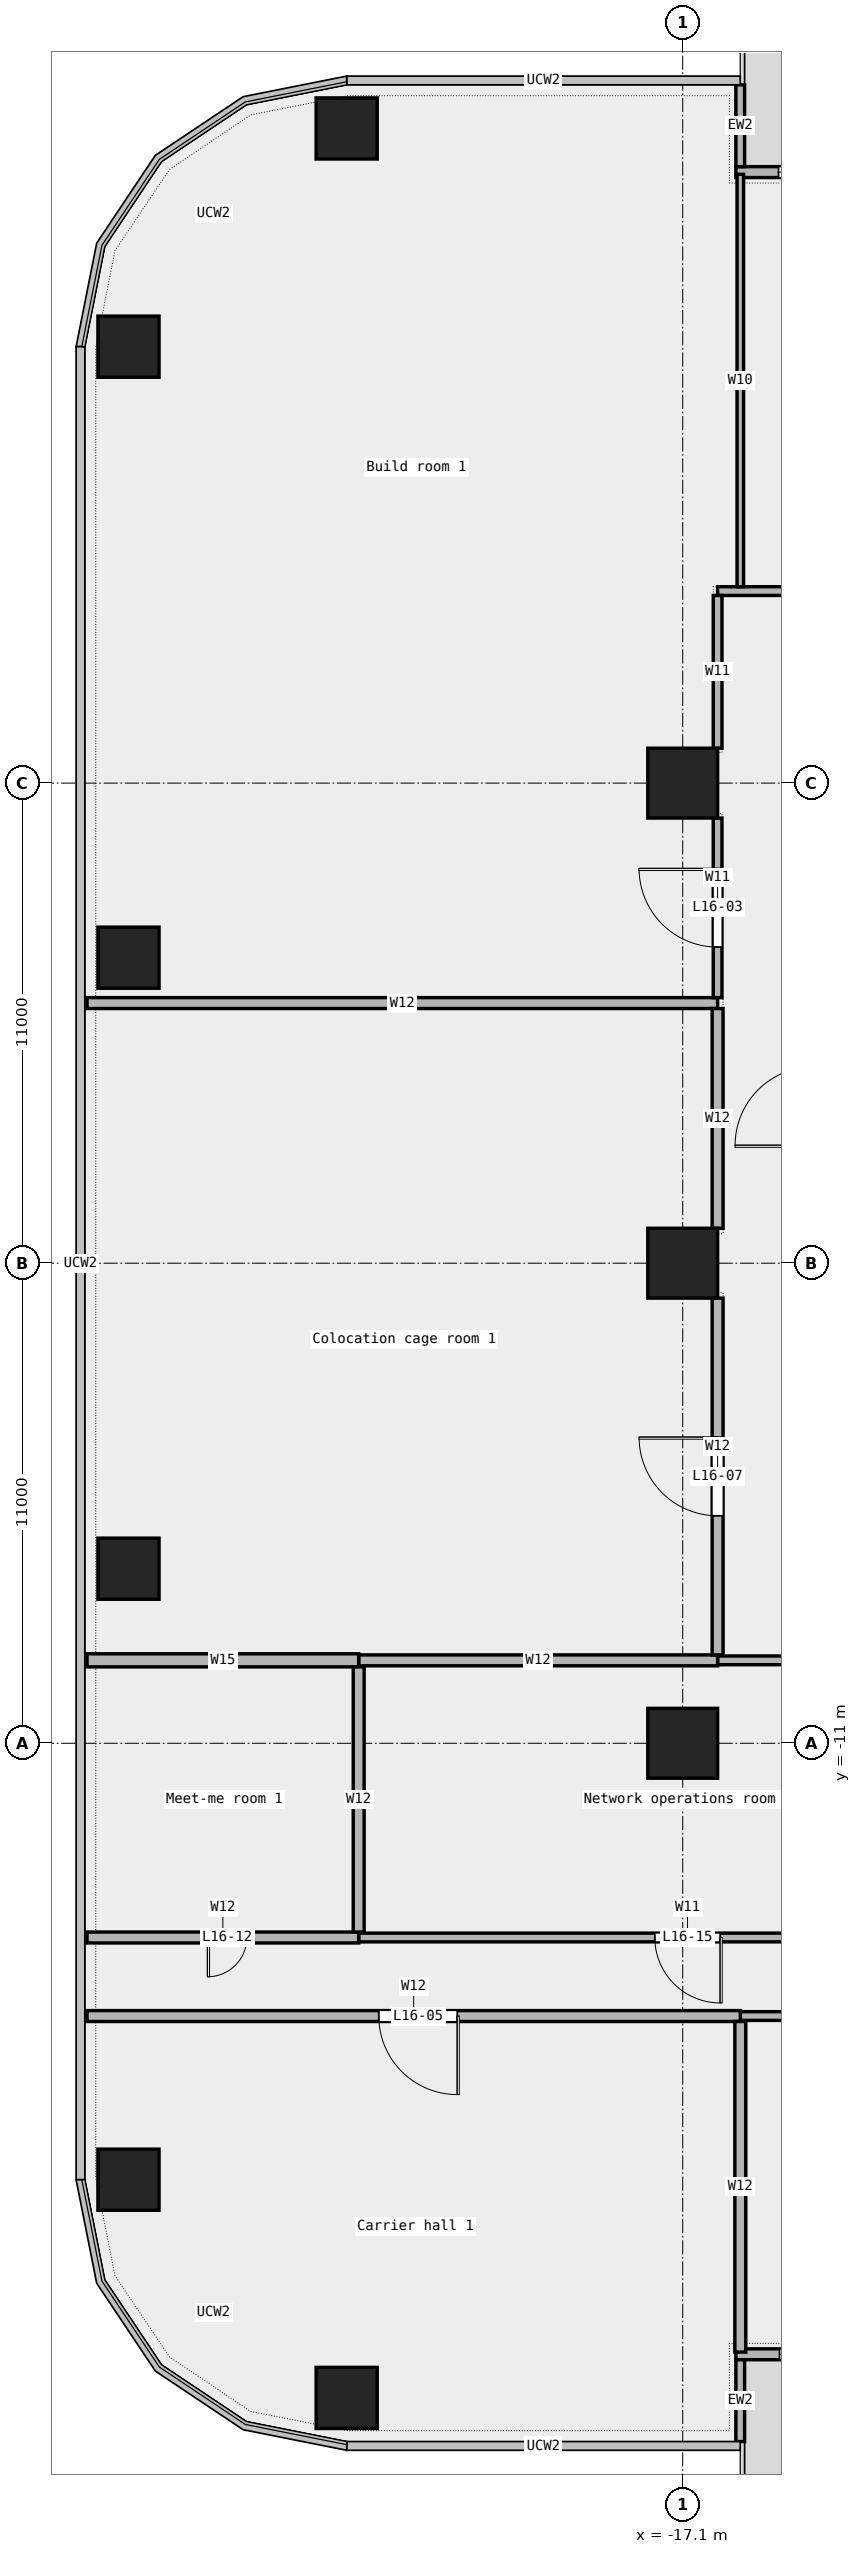
"""IFC4 building model, lengths in metres.
Left out: names, types, materials, properties, quantities, classifications, styles, units other than length and angle.
Written with IfcOpenShell. Run it as: python <this file> out.ifc"""

import sys

from ifc_helpers import new_model, si_unit, direction, frame, frame_2d, origin, origin_2d, place, context, subcontext, project, spatial, rectangle, extrude, element, fill, save


model = new_model("IFC4")
c1 = context("Model", 3, precision=1e-05, world=origin(), true_north=direction((0.0, 1.0)))
c2 = subcontext(c1, "Body", "Model", "MODEL_VIEW")
j1 = project(units=[si_unit("LENGTHUNIT", "METRE"), si_unit("PLANEANGLEUNIT", "RADIAN")], contexts=[c1])
p1 = place(None, origin())
s1 = spatial("IfcSite", under=j1, at=p1, CompositionType="ELEMENT")
p2 = place(p1, origin())
s2 = spatial("IfcBuilding", under=s1, at=p2, CompositionType="ELEMENT")
p3 = place(p2, frame((0.0, 0.0, 83.8)))
s3 = spatial("IfcBuildingStorey", under=s2, at=p3, CompositionType="ELEMENT", Elevation=83.8)
for number, where, z_axis, x_axis in (
    (1, (-24.8, -26.0, 0.0), (0.0, 0.0, 1.0), (1.0, 0.0, 0.0)),
    (2, (-24.8, 26.0, 0.0), (0.0, 0.0, 1.0), (1.0, 0.0, 0.0)),
    (3, (-29.8, 21.0, 0.0), (0.0, 0.0, 1.0), (1.0, 0.0, 0.0)),
    (4, (-29.8, 7.0, 0.0), (0.0, 0.0, 1.0), (1.0, 0.0, 0.0)),
    (5, (-29.8, -7.0, 0.0), (0.0, 0.0, 1.0), (1.0, 0.0, 0.0)),
    (6, (-29.8, -21.0, 0.0), (0.0, 0.0, 1.0), (1.0, 0.0, 0.0)),
):
    element("IfcColumn", number, at=place(p3, frame(where, z_axis=z_axis, x_axis=x_axis)), inside=s3, PredefinedType="COLUMN", context=c2, shape_type="SweptSolid", body=[
        extrude(rectangle(XDim=1.4, YDim=1.4, at=origin_2d()), origin(), (0.0, 0.0, 1.0), 4.2),
    ])
for number, where, z_axis, x_axis in (
    (7, (-17.1, -11.0, 0.0), (0.0, 0.0, 1.0), (1.0, 0.0, 0.0)),
    (8, (-17.1, 0.0, 0.0), (0.0, 0.0, 1.0), (1.0, 0.0, 0.0)),
    (9, (-17.1, 11.0, 0.0), (0.0, 0.0, 1.0), (1.0, 0.0, 0.0)),
):
    element("IfcColumn", number, at=place(p3, frame(where, z_axis=z_axis, x_axis=x_axis)), inside=s3, PredefinedType="COLUMN", context=c2, shape_type="SweptSolid", body=[
        extrude(rectangle(XDim=1.6, YDim=1.6, at=origin_2d()), origin(), (0.0, 0.0, 1.0), 4.2),
    ])
p4 = place(p3, frame((-2.155, 25.0, 0.0), z_axis=(0.0, 0.0, 1.0), x_axis=(-1.0, 0.0, 0.0)))
e10 = element("IfcWall", 10, at=p4, inside=s3, PredefinedType="STANDARD", context=c2, shape_type="SweptSolid", body=[
    extrude(rectangle(XDim=13.727, YDim=0.25, at=frame_2d((6.864, 0.0))), origin(), (0.0, 0.0, 1.0), 4.2),
])
p5 = place(p4, frame((1.75, 0.0, 0.45)))
e11 = element("IfcOpeningElement", 11, at=p5, cuts=e10, PredefinedType="OPENING", context=c2, shape_type="SweptSolid", body=[
    extrude(rectangle(XDim=1.5, YDim=3.0, at=frame_2d((0.75, 1.5))), frame((0.0, 0.137, 0.0), z_axis=(0.0, -1.0, 0.0), x_axis=(1.0, 0.0, 0.0)), (0.0, 0.0, 1.0), 0.274),
])
p6 = place(p4, frame((6.0, 0.0, 0.0)))
e12 = element("IfcOpeningElement", 12, at=p6, cuts=e10, PredefinedType="OPENING", context=c2, shape_type="SweptSolid", body=[
    extrude(rectangle(XDim=1.8, YDim=2.4, at=frame_2d((0.9, 1.2))), frame((0.0, 0.137, 0.0), z_axis=(0.0, -1.0, 0.0), x_axis=(1.0, 0.0, 0.0)), (0.0, 0.0, 1.0), 0.274),
])
p7 = place(p4, frame((11.25, 0.0, 0.45)))
e13 = element("IfcOpeningElement", 13, at=p7, cuts=e10, PredefinedType="OPENING", context=c2, shape_type="SweptSolid", body=[
    extrude(rectangle(XDim=1.5, YDim=3.0, at=frame_2d((0.75, 1.5))), frame((0.0, 0.137, 0.0), z_axis=(0.0, -1.0, 0.0), x_axis=(1.0, 0.0, 0.0)), (0.0, 0.0, 1.0), 0.274),
])
p8 = place(p3, frame((-15.782, 27.0, 0.0), z_axis=(0.0, 0.0, 1.0), x_axis=(0.0, -1.0, 0.0)))
e14 = element("IfcWall", 14, at=p8, inside=s3, PredefinedType="STANDARD", context=c2, shape_type="SweptSolid", body=[
    extrude(rectangle(XDim=1.875, YDim=0.2, at=frame_2d((0.938, 0.0))), origin(), (0.0, 0.0, 1.0), 4.2),
])
p9 = place(p3, frame((-15.882, -25.0, 0.0), z_axis=(0.0, 0.0, 1.0), x_axis=(1.0, 0.0, 0.0)))
e15 = element("IfcWall", 15, at=p9, inside=s3, PredefinedType="STANDARD", context=c2, shape_type="SweptSolid", body=[
    extrude(rectangle(XDim=13.727, YDim=0.25, at=frame_2d((6.864, 0.0))), origin(), (0.0, 0.0, 1.0), 4.2),
])
p10 = place(p9, frame((1.0, 0.0, 0.45)))
e16 = element("IfcOpeningElement", 16, at=p10, cuts=e15, PredefinedType="OPENING", context=c2, shape_type="SweptSolid", body=[
    extrude(rectangle(XDim=1.5, YDim=3.0, at=frame_2d((0.75, 1.5))), frame((0.0, 0.137, 0.0), z_axis=(0.0, -1.0, 0.0), x_axis=(1.0, 0.0, 0.0)), (0.0, 0.0, 1.0), 0.274),
])
p11 = place(p9, frame((6.0, 0.0, 0.0)))
e17 = element("IfcOpeningElement", 17, at=p11, cuts=e15, PredefinedType="OPENING", context=c2, shape_type="SweptSolid", body=[
    extrude(rectangle(XDim=1.8, YDim=2.4, at=frame_2d((0.9, 1.2))), frame((0.0, 0.137, 0.0), z_axis=(0.0, -1.0, 0.0), x_axis=(1.0, 0.0, 0.0)), (0.0, 0.0, 1.0), 0.274),
])
p12 = place(p9, frame((10.5, 0.0, 0.45)))
e18 = element("IfcOpeningElement", 18, at=p12, cuts=e15, PredefinedType="OPENING", context=c2, shape_type="SweptSolid", body=[
    extrude(rectangle(XDim=1.5, YDim=3.0, at=frame_2d((0.75, 1.5))), frame((0.0, 0.137, 0.0), z_axis=(0.0, -1.0, 0.0), x_axis=(1.0, 0.0, 0.0)), (0.0, 0.0, 1.0), 0.274),
])
p13 = place(p3, frame((-15.782, -27.0, 0.0), z_axis=(0.0, 0.0, 1.0), x_axis=(0.0, 1.0, 0.0)))
e19 = element("IfcWall", 19, at=p13, inside=s3, PredefinedType="STANDARD", context=c2, shape_type="SweptSolid", body=[
    extrude(rectangle(XDim=1.875, YDim=0.2, at=frame_2d((0.938, 0.0))), origin(), (0.0, 0.0, 1.0), 4.2),
])
p14 = place(p3, frame((-15.78, -17.25, 0.0), z_axis=(0.0, 0.0, 1.0), x_axis=(1.0, 0.0, 0.0)))
e20 = element("IfcWall", 20, at=p14, inside=s3, PredefinedType="PARTITIONING", context=c2, shape_type="SweptSolid", body=[
    extrude(rectangle(XDim=13.525, YDim=0.2, at=frame_2d((6.763, 0.0))), origin(), (0.0, 0.0, 1.0), 4.2),
])
p15 = place(p14, frame((6.012, 0.0, 0.0)))
e21 = element("IfcOpeningElement", 21, at=p15, cuts=e20, PredefinedType="OPENING", context=c2, shape_type="SweptSolid", body=[
    extrude(rectangle(XDim=1.5, YDim=2.1, at=frame_2d((0.75, 1.05))), frame((0.0, 0.112, 0.0), z_axis=(0.0, -1.0, 0.0), x_axis=(1.0, 0.0, 0.0)), (0.0, 0.0, 1.0), 0.224),
])
p16 = place(p3, frame((-30.75, -17.25, 0.0), z_axis=(0.0, 0.0, 1.0), x_axis=(1.0, 0.0, 0.0)))
e22 = element("IfcWall", 22, at=p16, inside=s3, PredefinedType="PARTITIONING", context=c2, shape_type="SweptSolid", body=[
    extrude(rectangle(XDim=14.97, YDim=0.25, at=frame_2d((7.485, 0.0))), origin(), (0.0, 0.0, 1.0), 4.2),
])
p17 = place(p16, frame((6.685, 0.0, 0.0)))
e23 = element("IfcOpeningElement", 23, at=p17, cuts=e22, PredefinedType="OPENING", context=c2, shape_type="SweptSolid", body=[
    extrude(rectangle(XDim=1.8, YDim=2.1, at=frame_2d((0.9, 1.05))), frame((0.0, 0.137, 0.0), z_axis=(0.0, -1.0, 0.0), x_axis=(1.0, 0.0, 0.0)), (0.0, 0.0, 1.0), 0.274),
])
p18 = place(p3, frame((-24.525, -15.45, 0.0), z_axis=(0.0, 0.0, 1.0), x_axis=(1.0, 0.0, 0.0)))
e24 = element("IfcWall", 24, at=p18, inside=s3, PredefinedType="PARTITIONING", context=c2, shape_type="SweptSolid", body=[
    extrude(rectangle(XDim=15.07, YDim=0.2, at=frame_2d((7.535, 0.0))), origin(), (0.0, 0.0, 1.0), 4.2),
])
p19 = place(p18, frame((6.785, 0.0, 0.0)))
e25 = element("IfcOpeningElement", 25, at=p19, cuts=e24, PredefinedType="OPENING", context=c2, shape_type="SweptSolid", body=[
    extrude(rectangle(XDim=1.5, YDim=2.1, at=frame_2d((0.75, 1.05))), frame((0.0, 0.112, 0.0), z_axis=(0.0, -1.0, 0.0), x_axis=(1.0, 0.0, 0.0)), (0.0, 0.0, 1.0), 0.224),
])
p20 = place(p3, frame((-30.75, -15.45, 0.0), z_axis=(0.0, 0.0, 1.0), x_axis=(1.0, 0.0, 0.0)))
e26 = element("IfcWall", 26, at=p20, inside=s3, PredefinedType="PARTITIONING", context=c2, shape_type="SweptSolid", body=[
    extrude(rectangle(XDim=6.225, YDim=0.25, at=frame_2d((3.113, 0.0))), origin(), (0.0, 0.0, 1.0), 4.2),
])
p21 = place(p20, frame((2.762, 0.0, 0.0)))
e27 = element("IfcOpeningElement", 27, at=p21, cuts=e26, PredefinedType="OPENING", context=c2, shape_type="SweptSolid", body=[
    extrude(rectangle(XDim=0.9, YDim=2.1, at=frame_2d((0.45, 1.05))), frame((0.0, 0.137, 0.0), z_axis=(0.0, -1.0, 0.0), x_axis=(1.0, 0.0, 0.0)), (0.0, 0.0, 1.0), 0.274),
])
p22 = place(p3, frame((-16.3, -9.1, 0.0), z_axis=(0.0, 0.0, 1.0), x_axis=(1.0, 0.0, 0.0)))
e28 = element("IfcWall", 28, at=p22, inside=s3, PredefinedType="PARTITIONING", context=c2, shape_type="SweptSolid", body=[
    extrude(rectangle(XDim=6.845, YDim=0.2, at=frame_2d((3.422, 0.0))), origin(), (0.0, 0.0, 1.0), 4.2),
])
p23 = place(p3, frame((-24.525, -9.1, 0.0), z_axis=(0.0, 0.0, 1.0), x_axis=(1.0, 0.0, 0.0)))
e29 = element("IfcWall", 29, at=p23, inside=s3, PredefinedType="PARTITIONING", context=c2, shape_type="SweptSolid", body=[
    extrude(rectangle(XDim=8.225, YDim=0.25, at=frame_2d((4.112, 0.0))), origin(), (0.0, 0.0, 1.0), 4.2),
])
p24 = place(p3, frame((-30.75, -9.1, 0.0), z_axis=(0.0, 0.0, 1.0), x_axis=(1.0, 0.0, 0.0)))
e30 = element("IfcWall", 30, at=p24, inside=s3, PredefinedType="PARTITIONING", context=c2, shape_type="SweptSolid", body=[
    extrude(rectangle(XDim=6.225, YDim=0.3, at=frame_2d((3.113, 0.0))), origin(), (0.0, 0.0, 1.0), 4.2),
])
p25 = place(p3, frame((-30.75, 5.96, 0.0), z_axis=(0.0, 0.0, 1.0), x_axis=(1.0, 0.0, 0.0)))
e31 = element("IfcWall", 31, at=p25, inside=s3, PredefinedType="PARTITIONING", context=c2, shape_type="SweptSolid", body=[
    extrude(rectangle(XDim=14.45, YDim=0.25, at=frame_2d((7.225, 0.0))), origin(), (0.0, 0.0, 1.0), 4.2),
])
p26 = place(p3, frame((-16.3, 15.4, 0.0), z_axis=(0.0, 0.0, 1.0), x_axis=(1.0, 0.0, 0.0)))
e32 = element("IfcWall", 32, at=p26, inside=s3, PredefinedType="PARTITIONING", context=c2, shape_type="SweptSolid", body=[
    extrude(rectangle(XDim=14.045, YDim=0.2, at=frame_2d((7.022, 0.0))), origin(), (0.0, 0.0, 1.0), 4.2),
])
p27 = place(p26, frame((6.532, 0.0, 0.0)))
e33 = element("IfcOpeningElement", 33, at=p27, cuts=e32, PredefinedType="OPENING", context=c2, shape_type="SweptSolid", body=[
    extrude(rectangle(XDim=1.5, YDim=2.1, at=frame_2d((0.75, 1.05))), frame((0.0, 0.112, 0.0), z_axis=(0.0, -1.0, 0.0), x_axis=(1.0, 0.0, 0.0)), (0.0, 0.0, 1.0), 0.224),
])
p28 = place(p3, frame((-24.525, -15.325, 0.0), z_axis=(0.0, 0.0, 1.0), x_axis=(0.0, 1.0, 0.0)))
e34 = element("IfcWall", 34, at=p28, inside=s3, PredefinedType="PARTITIONING", context=c2, shape_type="SweptSolid", body=[
    extrude(rectangle(XDim=6.075, YDim=0.25, at=frame_2d((3.038, 0.0))), origin(), (0.0, 0.0, 1.0), 4.2),
])
p29 = place(p3, frame((-16.3, 6.085, 0.0), z_axis=(0.0, 0.0, 1.0), x_axis=(0.0, 1.0, 0.0)))
e35 = element("IfcWall", 35, at=p29, inside=s3, PredefinedType="PARTITIONING", context=c2, shape_type="SweptSolid", body=[
    extrude(rectangle(XDim=4.115, YDim=0.2, at=frame_2d((2.058, 0.0))), origin(), (0.0, 0.0, 1.0), 4.2),
])
p30 = place(p29, frame((1.157, 0.0, 0.0)))
e36 = element("IfcOpeningElement", 36, at=p30, cuts=e35, PredefinedType="OPENING", context=c2, shape_type="SweptSolid", body=[
    extrude(rectangle(XDim=1.8, YDim=2.1, at=frame_2d((0.9, 1.05))), frame((0.0, 0.112, 0.0), z_axis=(0.0, -1.0, 0.0), x_axis=(1.0, 0.0, 0.0)), (0.0, 0.0, 1.0), 0.224),
])
p31 = place(p3, frame((-16.3, 11.8, 0.0), z_axis=(0.0, 0.0, 1.0), x_axis=(0.0, 1.0, 0.0)))
e37 = element("IfcWall", 37, at=p31, inside=s3, PredefinedType="PARTITIONING", context=c2, shape_type="SweptSolid", body=[
    extrude(rectangle(XDim=3.5, YDim=0.2, at=frame_2d((1.75, 0.0))), origin(), (0.0, 0.0, 1.0), 4.2),
])
p32 = place(p3, frame((-16.3, -8.975, 0.0), z_axis=(0.0, 0.0, 1.0), x_axis=(0.0, 1.0, 0.0)))
e38 = element("IfcWall", 38, at=p32, inside=s3, PredefinedType="PARTITIONING", context=c2, shape_type="SweptSolid", body=[
    extrude(rectangle(XDim=8.175, YDim=0.25, at=frame_2d((4.087, 0.0))), origin(), (0.0, 0.0, 1.0), 4.2),
])
p33 = place(p32, frame((3.188, 0.0, 0.0)))
e39 = element("IfcOpeningElement", 39, at=p33, cuts=e38, PredefinedType="OPENING", context=c2, shape_type="SweptSolid", body=[
    extrude(rectangle(XDim=1.8, YDim=2.1, at=frame_2d((0.9, 1.05))), frame((0.0, 0.137, 0.0), z_axis=(0.0, -1.0, 0.0), x_axis=(1.0, 0.0, 0.0)), (0.0, 0.0, 1.0), 0.274),
])
p34 = place(p3, frame((-16.3, 0.8, 0.0), z_axis=(0.0, 0.0, 1.0), x_axis=(0.0, 1.0, 0.0)))
e40 = element("IfcWall", 40, at=p34, inside=s3, PredefinedType="PARTITIONING", context=c2, shape_type="SweptSolid", body=[
    extrude(rectangle(XDim=5.035, YDim=0.25, at=frame_2d((2.518, 0.0))), origin(), (0.0, 0.0, 1.0), 4.2),
])
p35 = place(p3, frame((-15.78, 15.5, 0.0), z_axis=(0.0, 0.0, 1.0), x_axis=(0.0, 1.0, 0.0)))
e41 = element("IfcWall", 41, at=p35, inside=s3, PredefinedType="PARTITIONING", context=c2, shape_type="SweptSolid", body=[
    extrude(rectangle(XDim=9.45, YDim=0.15, at=frame_2d((4.725, 0.0))), origin(), (0.0, 0.0, 1.0), 4.2),
])
p36 = place(p3, frame((-15.78, -24.95, 0.0), z_axis=(0.0, 0.0, 1.0), x_axis=(0.0, 1.0, 0.0)))
e42 = element("IfcWall", 42, at=p36, inside=s3, PredefinedType="PARTITIONING", context=c2, shape_type="SweptSolid", body=[
    extrude(rectangle(XDim=7.575, YDim=0.25, at=frame_2d((3.788, 0.0))), origin(), (0.0, 0.0, 1.0), 4.2),
])
p37 = place(p7, origin())
e43 = element("IfcWindow", 43, at=p37, inside=s3, PartitioningType="SINGLE_PANEL", PredefinedType="WINDOW", context=c2, shape_type="SweptSolid", body=[
    extrude(rectangle(XDim=1.5, YDim=3.0, at=frame_2d((0.75, 1.5))), frame((0.0, 0.03, 0.0), z_axis=(0.0, -1.0, 0.0), x_axis=(1.0, 0.0, 0.0)), (0.0, 0.0, 1.0), 0.06),
])
fill(e13, e43)
p38 = place(p10, origin())
e44 = element("IfcWindow", 44, at=p38, inside=s3, PartitioningType="SINGLE_PANEL", PredefinedType="WINDOW", context=c2, shape_type="SweptSolid", body=[
    extrude(rectangle(XDim=1.5, YDim=3.0, at=frame_2d((0.75, 1.5))), frame((0.0, 0.03, 0.0), z_axis=(0.0, -1.0, 0.0), x_axis=(1.0, 0.0, 0.0)), (0.0, 0.0, 1.0), 0.06),
])
fill(e16, e44)
p39 = place(p30, origin())
e45 = element("IfcDoor", 45, at=p39, inside=s3, OperationType="DOUBLE_DOOR_SINGLE_SWING", PredefinedType="DOOR", context=c2, shape_type="SweptSolid", body=[
    extrude(rectangle(XDim=1.8, YDim=2.1, at=frame_2d((0.9, 1.05))), frame((0.0, 0.025, 0.0), z_axis=(0.0, -1.0, 0.0), x_axis=(1.0, 0.0, 0.0)), (0.0, 0.0, 1.0), 0.05),
])
fill(e36, e45)
p40 = place(p17, origin())
e46 = element("IfcDoor", 46, at=p40, inside=s3, OperationType="DOUBLE_DOOR_SINGLE_SWING", PredefinedType="DOOR", context=c2, shape_type="SweptSolid", body=[
    extrude(rectangle(XDim=1.8, YDim=2.1, at=frame_2d((0.9, 1.05))), frame((0.0, 0.025, 0.0), z_axis=(0.0, -1.0, 0.0), x_axis=(1.0, 0.0, 0.0)), (0.0, 0.0, 1.0), 0.05),
])
fill(e23, e46)
p41 = place(p33, origin())
e47 = element("IfcDoor", 47, at=p41, inside=s3, OperationType="DOUBLE_DOOR_SINGLE_SWING", PredefinedType="DOOR", context=c2, shape_type="SweptSolid", body=[
    extrude(rectangle(XDim=1.8, YDim=2.1, at=frame_2d((0.9, 1.05))), frame((0.0, 0.025, 0.0), z_axis=(0.0, -1.0, 0.0), x_axis=(1.0, 0.0, 0.0)), (0.0, 0.0, 1.0), 0.05),
])
fill(e39, e47)
p42 = place(p21, origin())
e48 = element("IfcDoor", 48, at=p42, inside=s3, OperationType="SINGLE_SWING_RIGHT", PredefinedType="DOOR", context=c2, shape_type="SweptSolid", body=[
    extrude(rectangle(XDim=0.9, YDim=2.1, at=frame_2d((0.45, 1.05))), frame((0.0, 0.025, 0.0), z_axis=(0.0, -1.0, 0.0), x_axis=(1.0, 0.0, 0.0)), (0.0, 0.0, 1.0), 0.05),
])
fill(e27, e48)
p43 = place(p19, origin())
e49 = element("IfcDoor", 49, at=p43, inside=s3, OperationType="DOUBLE_DOOR_SINGLE_SWING", PredefinedType="DOOR", context=c2, shape_type="SweptSolid", body=[
    extrude(rectangle(XDim=1.5, YDim=2.1, at=frame_2d((0.75, 1.05))), frame((0.0, 0.025, 0.0), z_axis=(0.0, -1.0, 0.0), x_axis=(1.0, 0.0, 0.0)), (0.0, 0.0, 1.0), 0.05),
])
fill(e25, e49)
save(model, sys.argv[1])
